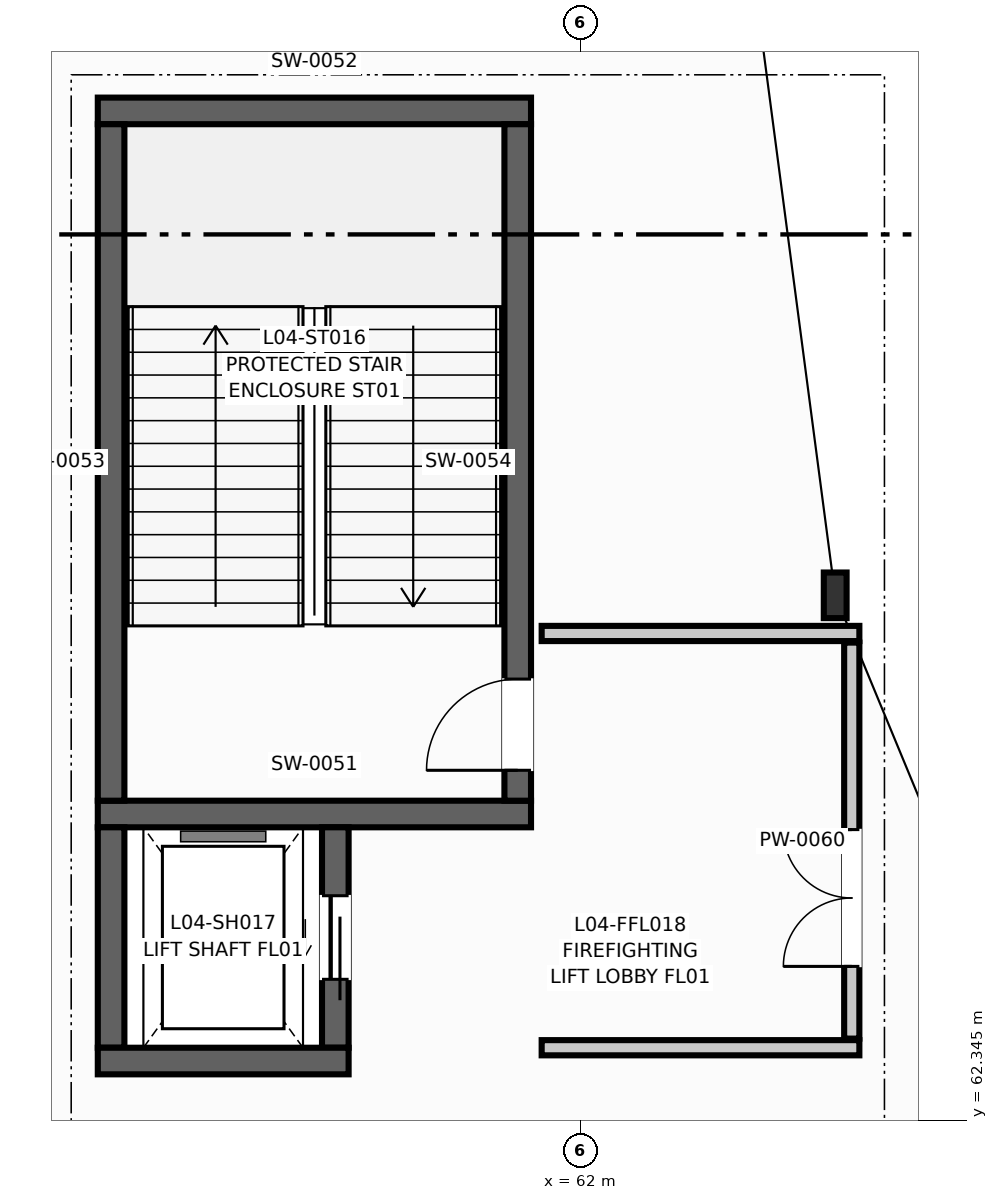
"""IFC4 building model, lengths in metres.
Left out: names, types, materials, properties, quantities, classifications, styles, units other than length and angle.
Written with IfcOpenShell. Run it as: python <this file> out.ifc"""

import sys

from ifc_helpers import new_model, si_unit, direction, frame, frame_2d, origin, origin_2d, place, context, subcontext, project, spatial, rectangle, i_section, extrude, element, fill, save


model = new_model("IFC4")
c1 = context("Model", 3, precision=1e-05, world=origin(), true_north=direction((0.0, 1.0)))
c2 = subcontext(c1, "Body", "Model", "MODEL_VIEW")
j1 = project(units=[si_unit("LENGTHUNIT", "METRE"), si_unit("PLANEANGLEUNIT", "RADIAN")], contexts=[c1])
p1 = place(None, origin())
s1 = spatial("IfcSite", under=j1, at=p1, CompositionType="ELEMENT")
p2 = place(p1, origin())
s2 = spatial("IfcBuilding", under=s1, at=p2, CompositionType="ELEMENT")
p3 = place(p2, frame((0.0, 0.0, 18.0)))
s3 = spatial("IfcBuildingStorey", under=s2, at=p3, CompositionType="ELEMENT", Elevation=18.0)
p4 = place(p3, frame((65.352, 69.252, 0.0), z_axis=(0.0, 0.0, 1.0), x_axis=(1.0, 0.0, 0.0)))
e1 = element("IfcColumn", 1, at=p4, inside=s3, PredefinedType="COLUMN", context=c2, shape_type="SweptSolid", body=[
    extrude(i_section(OverallWidth=0.3, OverallDepth=0.6, WebThickness=0.015, FlangeThickness=0.03, at=origin_2d()), origin(), (0.0, 0.0, 1.0), 4.5),
])
for number, where, z_axis, x_axis in (
    (2, (55.65, 66.375, 0.0), (0.0, 0.0, 1.0), (1.0, 0.0, 0.0)),
    (3, (55.65, 75.625, 0.0), (0.0, 0.0, 1.0), (1.0, 0.0, 0.0)),
):
    element("IfcWall", number, at=place(p3, frame(where, z_axis=z_axis, x_axis=x_axis)), inside=s3, PredefinedType="SHEAR", context=c2, shape_type="SweptSolid", body=[
        extrude(rectangle(XDim=5.7, YDim=0.35, at=frame_2d((2.85, 0.0))), origin(), (0.0, 0.0, 1.0), 4.25),
    ])
p5 = place(p3, frame((55.825, 66.55, 0.0), z_axis=(0.0, 0.0, 1.0), x_axis=(0.0, 1.0, 0.0)))
e4 = element("IfcWall", 4, at=p5, inside=s3, PredefinedType="SHEAR", context=c2, shape_type="SweptSolid", body=[
    extrude(rectangle(XDim=8.9, YDim=0.35, at=frame_2d((4.45, 0.0))), origin(), (0.0, 0.0, 1.0), 4.25),
])
p6 = place(p3, frame((61.175, 66.55, 0.0), z_axis=(0.0, 0.0, 1.0), x_axis=(0.0, 1.0, 0.0)))
e5 = element("IfcWall", 5, at=p6, inside=s3, PredefinedType="SHEAR", context=c2, shape_type="SweptSolid", body=[
    extrude(rectangle(XDim=8.9, YDim=0.35, at=frame_2d((4.45, 0.0))), origin(), (0.0, 0.0, 1.0), 4.25),
])
p7 = place(p6, frame((0.4, 0.0, 0.0)))
e6 = element("IfcOpeningElement", 6, at=p7, cuts=e5, PredefinedType="OPENING", context=c2, shape_type="SweptSolid", body=[
    extrude(rectangle(XDim=1.2, YDim=2.2, at=frame_2d((0.6, 1.1))), frame((0.0, 0.185, 0.0), z_axis=(0.0, -1.0, 0.0), x_axis=(1.0, 0.0, 0.0)), (0.0, 0.0, 1.0), 0.37),
])
p8 = place(p3, frame((55.825, 63.3, 0.0), z_axis=(0.0, 0.0, 1.0), x_axis=(0.0, 1.0, 0.0)))
e7 = element("IfcWall", 7, at=p8, inside=s3, PredefinedType="SHEAR", context=c2, shape_type="SweptSolid", body=[
    extrude(rectangle(XDim=2.9, YDim=0.35, at=frame_2d((1.45, 0.0))), origin(), (0.0, 0.0, 1.0), 4.25),
])
p9 = place(p3, frame((58.775, 63.3, 0.0), z_axis=(0.0, 0.0, 1.0), x_axis=(0.0, 1.0, 0.0)))
e8 = element("IfcWall", 8, at=p9, inside=s3, PredefinedType="SHEAR", context=c2, shape_type="SweptSolid", body=[
    extrude(rectangle(XDim=2.9, YDim=0.35, at=frame_2d((1.45, 0.0))), origin(), (0.0, 0.0, 1.0), 4.25),
])
p10 = place(p9, frame((0.9, 0.0, 0.0)))
e9 = element("IfcOpeningElement", 9, at=p10, cuts=e8, PredefinedType="OPENING", context=c2, shape_type="SweptSolid", body=[
    extrude(rectangle(XDim=1.1, YDim=2.2, at=frame_2d((0.55, 1.1))), frame((0.0, 0.185, 0.0), z_axis=(0.0, -1.0, 0.0), x_axis=(1.0, 0.0, 0.0)), (0.0, 0.0, 1.0), 0.37),
])
p11 = place(p3, frame((55.65, 63.125, 0.0), z_axis=(0.0, 0.0, 1.0), x_axis=(1.0, 0.0, 0.0)))
e10 = element("IfcWall", 10, at=p11, inside=s3, PredefinedType="SHEAR", context=c2, shape_type="SweptSolid", body=[
    extrude(rectangle(XDim=3.3, YDim=0.35, at=frame_2d((1.65, 0.0))), origin(), (0.0, 0.0, 1.0), 4.25),
])
for number, where, z_axis, x_axis in (
    (11, (61.49, 63.3, 0.0), (0.0, 0.0, 1.0), (1.0, 0.0, 0.0)),
    (12, (61.49, 68.75, 0.0), (0.0, 0.0, 1.0), (1.0, 0.0, 0.0)),
):
    element("IfcWall", number, at=place(p3, frame(where, z_axis=z_axis, x_axis=x_axis)), inside=s3, PredefinedType="PARTITIONING", context=c2, shape_type="SweptSolid", body=[
        extrude(rectangle(XDim=4.18, YDim=0.2, at=frame_2d((2.09, 0.0))), origin(), (0.0, 0.0, 1.0), 3.22),
    ])
p12 = place(p3, frame((65.57, 63.42, 0.0), z_axis=(0.0, 0.0, 1.0), x_axis=(0.0, 1.0, 0.0)))
e13 = element("IfcWall", 13, at=p12, inside=s3, PredefinedType="PARTITIONING", context=c2, shape_type="SweptSolid", body=[
    extrude(rectangle(XDim=5.21, YDim=0.2, at=frame_2d((2.605, 0.0))), origin(), (0.0, 0.0, 1.0), 3.22),
])
p13 = place(p12, frame((0.95, 0.0, 0.0)))
e14 = element("IfcOpeningElement", 14, at=p13, cuts=e13, PredefinedType="OPENING", context=c2, shape_type="SweptSolid", body=[
    extrude(rectangle(XDim=1.8, YDim=2.2, at=frame_2d((0.9, 1.1))), frame((0.0, 0.11, 0.0), z_axis=(0.0, -1.0, 0.0), x_axis=(1.0, 0.0, 0.0)), (0.0, 0.0, 1.0), 0.22),
])
p14 = place(p7, origin())
e15 = element("IfcDoor", 15, at=p14, inside=s3, OperationType="SINGLE_SWING_LEFT", PredefinedType="DOOR", context=c2, shape_type="SweptSolid", body=[
    extrude(rectangle(XDim=1.2, YDim=2.2, at=frame_2d((0.6, 1.1))), frame((0.0, 0.025, 0.0), z_axis=(0.0, -1.0, 0.0), x_axis=(1.0, 0.0, 0.0)), (0.0, 0.0, 1.0), 0.05),
])
fill(e6, e15)
p15 = place(p10, origin())
e16 = element("IfcDoor", 16, at=p15, inside=s3, OperationType="SLIDING_TO_LEFT", PredefinedType="DOOR", context=c2, shape_type="SweptSolid", body=[
    extrude(rectangle(XDim=1.1, YDim=2.2, at=frame_2d((0.55, 1.1))), frame((0.0, 0.025, 0.0), z_axis=(0.0, -1.0, 0.0), x_axis=(1.0, 0.0, 0.0)), (0.0, 0.0, 1.0), 0.05),
])
fill(e9, e16)
p16 = place(p13, origin())
e17 = element("IfcDoor", 17, at=p16, inside=s3, OperationType="DOUBLE_DOOR_SINGLE_SWING", PredefinedType="DOOR", context=c2, shape_type="SweptSolid", body=[
    extrude(rectangle(XDim=1.8, YDim=2.2, at=frame_2d((0.9, 1.1))), frame((0.0, 0.025, 0.0), z_axis=(0.0, -1.0, 0.0), x_axis=(1.0, 0.0, 0.0)), (0.0, 0.0, 1.0), 0.05),
])
fill(e14, e17)
save(model, sys.argv[1])
